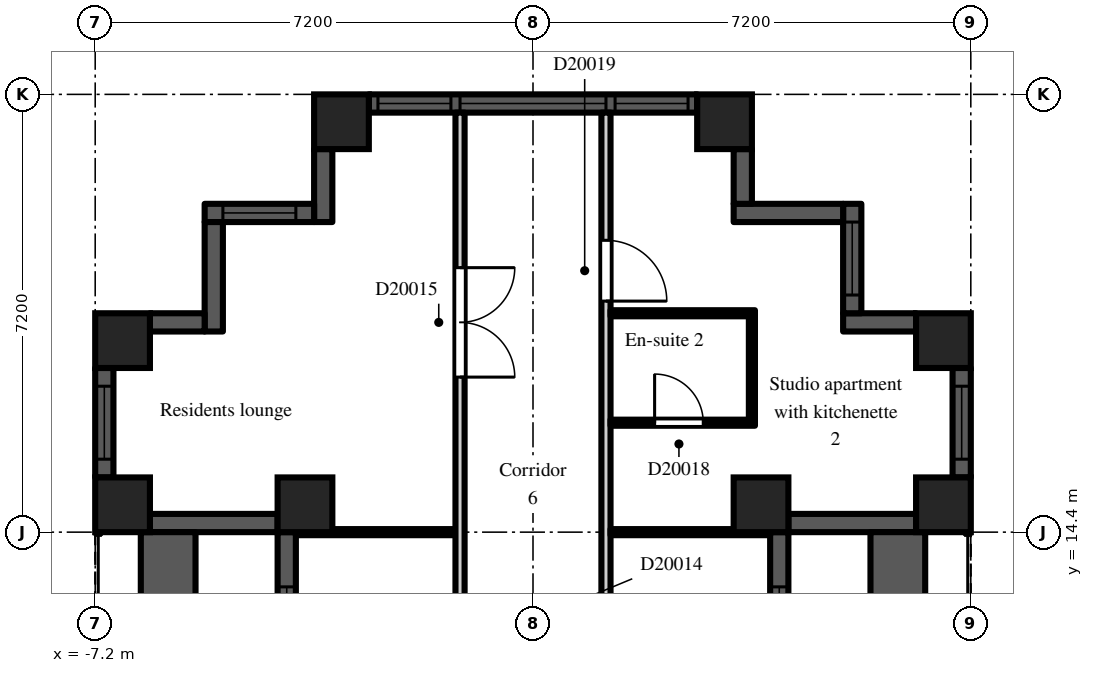
"""IFC4 building model, lengths in metres.
Left out: names, types, materials, properties, quantities, classifications, styles, units other than length and angle.
Written with IfcOpenShell. Run it as: python <this file> out.ifc"""

import sys

from ifc_helpers import new_model, si_unit, direction, frame, frame_2d, origin, origin_2d, place, context, subcontext, project, spatial, rectangle, extrude, element, fill, save


model = new_model("IFC4")
c1 = context("Model", 3, precision=1e-05, world=origin(), true_north=direction((0.0, 1.0)))
c2 = subcontext(c1, "Body", "Model", "MODEL_VIEW")
j1 = project(units=[si_unit("LENGTHUNIT", "METRE"), si_unit("PLANEANGLEUNIT", "RADIAN")], contexts=[c1])
p1 = place(None, origin())
s1 = spatial("IfcSite", under=j1, at=p1, CompositionType="ELEMENT")
p2 = place(p1, origin())
s2 = spatial("IfcBuilding", under=s1, at=p2, CompositionType="ELEMENT")
p3 = place(p2, frame((0.0, 0.0, 138.3)))
s3 = spatial("IfcBuildingStorey", under=s2, at=p3, CompositionType="ELEMENT", Elevation=138.3)
for number, where, z_axis, x_axis in (
    (1, (-6.75, 14.85, 0.0), (0.0, 0.0, 1.0), (1.0, 0.0, 0.0)),
    (2, (-6.75, 17.55, 0.0), (0.0, 0.0, 1.0), (1.0, 0.0, 0.0)),
    (3, (-3.75, 14.85, 0.0), (0.0, 0.0, 1.0), (1.0, 0.0, 0.0)),
    (4, (-3.15, 21.15, 0.0), (0.0, 0.0, 1.0), (1.0, 0.0, 0.0)),
    (5, (3.15, 21.15, 0.0), (0.0, 0.0, 1.0), (1.0, 0.0, 0.0)),
    (6, (3.75, 14.85, 0.0), (0.0, 0.0, 1.0), (1.0, 0.0, 0.0)),
    (7, (6.75, 14.85, 0.0), (0.0, 0.0, 1.0), (1.0, 0.0, 0.0)),
    (8, (6.75, 17.55, 0.0), (0.0, 0.0, 1.0), (1.0, 0.0, 0.0)),
):
    element("IfcColumn", number, at=place(p3, frame(where, z_axis=z_axis, x_axis=x_axis)), inside=s3, PredefinedType="COLUMN", context=c2, shape_type="SweptSolid", body=[
        extrude(rectangle(XDim=0.9, YDim=0.9, at=origin_2d()), origin(), (0.0, 0.0, 1.0), 3.0),
    ])
p4 = place(p3, frame((4.05, 7.2, 0.0), z_axis=(0.0, 0.0, 1.0), x_axis=(0.0, 1.0, 0.0)))
e9 = element("IfcWall", 9, at=p4, inside=s3, PredefinedType="SOLIDWALL", context=c2, shape_type="SweptSolid", body=[
    extrude(rectangle(XDim=7.2, YDim=0.3, at=frame_2d((3.6, 0.0))), origin(), (0.0, 0.0, 1.0), 2.2),
])
p5 = place(p4, frame((3.0, 0.0, 0.0)))
e10 = element("IfcOpeningElement", 10, at=p5, cuts=e9, PredefinedType="OPENING", context=c2, shape_type="SweptSolid", body=[
    extrude(rectangle(XDim=1.2, YDim=2.05, at=frame_2d((0.6, 1.025))), frame((0.0, 0.16, 0.0), z_axis=(0.0, -1.0, 0.0), x_axis=(1.0, 0.0, 0.0)), (0.0, 0.0, 1.0), 0.32),
])
p6 = place(p4, frame((0.9, 0.0, 0.2)))
e11 = element("IfcOpeningElement", 11, at=p6, cuts=e9, PredefinedType="OPENING", context=c2, shape_type="SweptSolid", body=[
    extrude(rectangle(XDim=1.8, YDim=1.85, at=frame_2d((0.9, 0.925))), frame((0.0, 0.16, 0.0), z_axis=(0.0, -1.0, 0.0), x_axis=(1.0, 0.0, 0.0)), (0.0, 0.0, 1.0), 0.32),
])
p7 = place(p4, frame((4.5, 0.0, 0.2)))
e12 = element("IfcOpeningElement", 12, at=p7, cuts=e9, PredefinedType="OPENING", context=c2, shape_type="SweptSolid", body=[
    extrude(rectangle(XDim=1.8, YDim=1.85, at=frame_2d((0.9, 0.925))), frame((0.0, 0.16, 0.0), z_axis=(0.0, -1.0, 0.0), x_axis=(1.0, 0.0, 0.0)), (0.0, 0.0, 1.0), 0.32),
])
p8 = place(p3, frame((4.2, 14.55, 0.0), z_axis=(0.0, 0.0, 1.0), x_axis=(1.0, 0.0, 0.0)))
e13 = element("IfcWall", 13, at=p8, inside=s3, PredefinedType="SOLIDWALL", context=c2, shape_type="SweptSolid", body=[
    extrude(rectangle(XDim=2.1, YDim=0.3, at=frame_2d((1.05, 0.0))), origin(), (0.0, 0.0, 1.0), 2.2),
])
p9 = place(p3, frame((7.05, 15.3, 0.0), z_axis=(0.0, 0.0, 1.0), x_axis=(0.0, 1.0, 0.0)))
e14 = element("IfcWall", 14, at=p9, inside=s3, PredefinedType="SOLIDWALL", context=c2, shape_type="SweptSolid", body=[
    extrude(rectangle(XDim=1.8, YDim=0.3, at=frame_2d((0.9, 0.0))), origin(), (0.0, 0.0, 1.0), 2.2),
])
p10 = place(p9, frame((0.3, 0.0, 0.2)))
e15 = element("IfcOpeningElement", 15, at=p10, cuts=e14, PredefinedType="OPENING", context=c2, shape_type="SweptSolid", body=[
    extrude(rectangle(XDim=1.2, YDim=1.85, at=frame_2d((0.6, 0.925))), frame((0.0, 0.16, 0.0), z_axis=(0.0, -1.0, 0.0), x_axis=(1.0, 0.0, 0.0)), (0.0, 0.0, 1.0), 0.32),
])
p11 = place(p3, frame((6.3, 17.85, 0.0), z_axis=(0.0, 0.0, 1.0), x_axis=(-1.0, 0.0, 0.0)))
e16 = element("IfcWall", 16, at=p11, inside=s3, PredefinedType="SOLIDWALL", context=c2, shape_type="SweptSolid", body=[
    extrude(rectangle(XDim=1.2, YDim=0.3, at=frame_2d((0.6, 0.0))), origin(), (0.0, 0.0, 1.0), 2.6),
])
p12 = place(p3, frame((5.25, 18.0, 0.0), z_axis=(0.0, 0.0, 1.0), x_axis=(0.0, 1.0, 0.0)))
e17 = element("IfcWall", 17, at=p12, inside=s3, PredefinedType="SOLIDWALL", context=c2, shape_type="SweptSolid", body=[
    extrude(rectangle(XDim=1.8, YDim=0.3, at=frame_2d((0.9, 0.0))), origin(), (0.0, 0.0, 1.0), 2.6),
])
p13 = place(p12, frame((0.3, 0.0, 0.2)))
e18 = element("IfcOpeningElement", 18, at=p13, cuts=e17, PredefinedType="OPENING", context=c2, shape_type="SweptSolid", body=[
    extrude(rectangle(XDim=1.2, YDim=1.85, at=frame_2d((0.6, 0.925))), frame((0.0, 0.16, 0.0), z_axis=(0.0, -1.0, 0.0), x_axis=(1.0, 0.0, 0.0)), (0.0, 0.0, 1.0), 0.32),
])
p14 = place(p3, frame((5.1, 19.65, 0.0), z_axis=(0.0, 0.0, 1.0), x_axis=(-1.0, 0.0, 0.0)))
e19 = element("IfcWall", 19, at=p14, inside=s3, PredefinedType="SOLIDWALL", context=c2, shape_type="SweptSolid", body=[
    extrude(rectangle(XDim=1.8, YDim=0.3, at=frame_2d((0.9, 0.0))), origin(), (0.0, 0.0, 1.0), 2.6),
])
p15 = place(p3, frame((3.45, 19.8, 0.0), z_axis=(0.0, 0.0, 1.0), x_axis=(0.0, 1.0, 0.0)))
e20 = element("IfcWall", 20, at=p15, inside=s3, PredefinedType="SOLIDWALL", context=c2, shape_type="SweptSolid", body=[
    extrude(rectangle(XDim=0.9, YDim=0.3, at=frame_2d((0.45, 0.0))), origin(), (0.0, 0.0, 1.0), 2.6),
])
p16 = place(p3, frame((2.7, 21.45, 0.0), z_axis=(0.0, 0.0, 1.0), x_axis=(-1.0, 0.0, 0.0)))
e21 = element("IfcWall", 21, at=p16, inside=s3, PredefinedType="SOLIDWALL", context=c2, shape_type="SweptSolid", body=[
    extrude(rectangle(XDim=5.4, YDim=0.3, at=frame_2d((2.7, 0.0))), origin(), (0.0, 0.0, 1.0), 2.2),
])
p17 = place(p16, frame((1.5, 0.0, 0.2)))
e22 = element("IfcOpeningElement", 22, at=p17, cuts=e21, PredefinedType="OPENING", context=c2, shape_type="SweptSolid", body=[
    extrude(rectangle(XDim=2.4, YDim=1.85, at=frame_2d((1.2, 0.925))), frame((0.0, 0.16, 0.0), z_axis=(0.0, -1.0, 0.0), x_axis=(1.0, 0.0, 0.0)), (0.0, 0.0, 1.0), 0.32),
])
p18 = place(p16, frame((0.15, 0.0, 0.2)))
e23 = element("IfcOpeningElement", 23, at=p18, cuts=e21, PredefinedType="OPENING", context=c2, shape_type="SweptSolid", body=[
    extrude(rectangle(XDim=1.2, YDim=1.85, at=frame_2d((0.6, 0.925))), frame((0.0, 0.16, 0.0), z_axis=(0.0, -1.0, 0.0), x_axis=(1.0, 0.0, 0.0)), (0.0, 0.0, 1.0), 0.32),
])
p19 = place(p16, frame((4.05, 0.0, 0.2)))
e24 = element("IfcOpeningElement", 24, at=p19, cuts=e21, PredefinedType="OPENING", context=c2, shape_type="SweptSolid", body=[
    extrude(rectangle(XDim=1.2, YDim=1.85, at=frame_2d((0.6, 0.925))), frame((0.0, 0.16, 0.0), z_axis=(0.0, -1.0, 0.0), x_axis=(1.0, 0.0, 0.0)), (0.0, 0.0, 1.0), 0.32),
])
p20 = place(p3, frame((-3.45, 20.7, 0.0), z_axis=(0.0, 0.0, 1.0), x_axis=(0.0, -1.0, 0.0)))
e25 = element("IfcWall", 25, at=p20, inside=s3, PredefinedType="SOLIDWALL", context=c2, shape_type="SweptSolid", body=[
    extrude(rectangle(XDim=1.2, YDim=0.3, at=frame_2d((0.6, 0.0))), origin(), (0.0, 0.0, 1.0), 2.6),
])
p21 = place(p3, frame((-3.6, 19.65, 0.0), z_axis=(0.0, 0.0, 1.0), x_axis=(-1.0, 0.0, 0.0)))
e26 = element("IfcWall", 26, at=p21, inside=s3, PredefinedType="SOLIDWALL", context=c2, shape_type="SweptSolid", body=[
    extrude(rectangle(XDim=1.8, YDim=0.3, at=frame_2d((0.9, 0.0))), origin(), (0.0, 0.0, 1.0), 2.6),
])
p22 = place(p21, frame((0.3, 0.0, 0.2)))
e27 = element("IfcOpeningElement", 27, at=p22, cuts=e26, PredefinedType="OPENING", context=c2, shape_type="SweptSolid", body=[
    extrude(rectangle(XDim=1.2, YDim=1.85, at=frame_2d((0.6, 0.925))), frame((0.0, 0.16, 0.0), z_axis=(0.0, -1.0, 0.0), x_axis=(1.0, 0.0, 0.0)), (0.0, 0.0, 1.0), 0.32),
])
p23 = place(p3, frame((-5.25, 19.5, 0.0), z_axis=(0.0, 0.0, 1.0), x_axis=(0.0, -1.0, 0.0)))
e28 = element("IfcWall", 28, at=p23, inside=s3, PredefinedType="SOLIDWALL", context=c2, shape_type="SweptSolid", body=[
    extrude(rectangle(XDim=1.8, YDim=0.3, at=frame_2d((0.9, 0.0))), origin(), (0.0, 0.0, 1.0), 2.6),
])
p24 = place(p3, frame((-5.4, 17.85, 0.0), z_axis=(0.0, 0.0, 1.0), x_axis=(-1.0, 0.0, 0.0)))
e29 = element("IfcWall", 29, at=p24, inside=s3, PredefinedType="SOLIDWALL", context=c2, shape_type="SweptSolid", body=[
    extrude(rectangle(XDim=0.9, YDim=0.3, at=frame_2d((0.45, 0.0))), origin(), (0.0, 0.0, 1.0), 2.6),
])
p25 = place(p3, frame((-7.05, 17.1, 0.0), z_axis=(0.0, 0.0, 1.0), x_axis=(0.0, -1.0, 0.0)))
e30 = element("IfcWall", 30, at=p25, inside=s3, PredefinedType="SOLIDWALL", context=c2, shape_type="SweptSolid", body=[
    extrude(rectangle(XDim=1.8, YDim=0.3, at=frame_2d((0.9, 0.0))), origin(), (0.0, 0.0, 1.0), 2.2),
])
p26 = place(p25, frame((0.3, 0.0, 0.2)))
e31 = element("IfcOpeningElement", 31, at=p26, cuts=e30, PredefinedType="OPENING", context=c2, shape_type="SweptSolid", body=[
    extrude(rectangle(XDim=1.2, YDim=1.85, at=frame_2d((0.6, 0.925))), frame((0.0, 0.16, 0.0), z_axis=(0.0, -1.0, 0.0), x_axis=(1.0, 0.0, 0.0)), (0.0, 0.0, 1.0), 0.32),
])
p27 = place(p3, frame((-6.3, 14.55, 0.0), z_axis=(0.0, 0.0, 1.0), x_axis=(1.0, 0.0, 0.0)))
e32 = element("IfcWall", 32, at=p27, inside=s3, PredefinedType="SOLIDWALL", context=c2, shape_type="SweptSolid", body=[
    extrude(rectangle(XDim=2.1, YDim=0.3, at=frame_2d((1.05, 0.0))), origin(), (0.0, 0.0, 1.0), 2.2),
])
p28 = place(p3, frame((-4.05, 14.4, 0.0), z_axis=(0.0, 0.0, 1.0), x_axis=(0.0, -1.0, 0.0)))
e33 = element("IfcWall", 33, at=p28, inside=s3, PredefinedType="SOLIDWALL", context=c2, shape_type="SweptSolid", body=[
    extrude(rectangle(XDim=7.2, YDim=0.3, at=frame_2d((3.6, 0.0))), origin(), (0.0, 0.0, 1.0), 2.2),
])
p29 = place(p28, frame((3.0, 0.0, 0.0)))
e34 = element("IfcOpeningElement", 34, at=p29, cuts=e33, PredefinedType="OPENING", context=c2, shape_type="SweptSolid", body=[
    extrude(rectangle(XDim=1.2, YDim=2.05, at=frame_2d((0.6, 1.025))), frame((0.0, 0.16, 0.0), z_axis=(0.0, -1.0, 0.0), x_axis=(1.0, 0.0, 0.0)), (0.0, 0.0, 1.0), 0.32),
])
p30 = place(p28, frame((0.9, 0.0, 0.2)))
e35 = element("IfcOpeningElement", 35, at=p30, cuts=e33, PredefinedType="OPENING", context=c2, shape_type="SweptSolid", body=[
    extrude(rectangle(XDim=1.8, YDim=1.85, at=frame_2d((0.9, 0.925))), frame((0.0, 0.16, 0.0), z_axis=(0.0, -1.0, 0.0), x_axis=(1.0, 0.0, 0.0)), (0.0, 0.0, 1.0), 0.32),
])
p31 = place(p28, frame((4.5, 0.0, 0.2)))
e36 = element("IfcOpeningElement", 36, at=p31, cuts=e33, PredefinedType="OPENING", context=c2, shape_type="SweptSolid", body=[
    extrude(rectangle(XDim=1.8, YDim=1.85, at=frame_2d((0.9, 0.925))), frame((0.0, 0.16, 0.0), z_axis=(0.0, -1.0, 0.0), x_axis=(1.0, 0.0, 0.0)), (0.0, 0.0, 1.0), 0.32),
])
for number, where, z_axis, x_axis in (
    (37, (6.0, 7.2, 0.0), (0.0, 0.0, 1.0), (0.0, 1.0, 0.0)),
    (38, (-6.0, 7.2, 0.0), (0.0, 0.0, 1.0), (0.0, 1.0, 0.0)),
):
    element("IfcWall", number, at=place(p3, frame(where, z_axis=z_axis, x_axis=x_axis)), inside=s3, PredefinedType="PARAPET", context=c2, shape_type="SweptSolid", body=[
        extrude(rectangle(XDim=7.2, YDim=0.9, at=frame_2d((3.6, 0.0))), origin(), (0.0, 0.0, 1.0), 0.8),
    ])
p32 = place(p3, frame((-3.9, 14.4, 0.0), z_axis=(0.0, 0.0, 1.0), x_axis=(1.0, 0.0, 0.0)))
e39 = element("IfcWall", 39, at=p32, inside=s3, PredefinedType="PARTITIONING", context=c2, shape_type="SweptSolid", body=[
    extrude(rectangle(XDim=2.625, YDim=0.1, at=frame_2d((1.312, 0.0))), origin(), (0.0, 0.0, 1.0), 2.6),
])
p33 = place(p3, frame((-1.2, 7.275, 0.0), z_axis=(0.0, 0.0, 1.0), x_axis=(0.0, 1.0, 0.0)))
e40 = element("IfcWall", 40, at=p33, inside=s3, PredefinedType="PARTITIONING", context=c2, shape_type="SweptSolid", body=[
    extrude(rectangle(XDim=14.025, YDim=0.15, at=frame_2d((7.013, 0.0))), origin(), (0.0, 0.0, 1.0), 2.6),
])
p34 = place(p33, frame((4.875, 0.0, 0.0)))
e41 = element("IfcOpeningElement", 41, at=p34, cuts=e40, PredefinedType="OPENING", context=c2, shape_type="SweptSolid", body=[
    extrude(rectangle(XDim=0.9, YDim=2.1, at=frame_2d((0.45, 1.05))), frame((0.0, 0.085, 0.0), z_axis=(0.0, -1.0, 0.0), x_axis=(1.0, 0.0, 0.0)), (0.0, 0.0, 1.0), 0.17),
])
p35 = place(p33, frame((9.675, 0.0, 0.0)))
e42 = element("IfcOpeningElement", 42, at=p35, cuts=e40, PredefinedType="OPENING", context=c2, shape_type="SweptSolid", body=[
    extrude(rectangle(XDim=1.8, YDim=2.1, at=frame_2d((0.9, 1.05))), frame((0.0, 0.085, 0.0), z_axis=(0.0, -1.0, 0.0), x_axis=(1.0, 0.0, 0.0)), (0.0, 0.0, 1.0), 0.17),
])
p36 = place(p3, frame((1.2, 7.125, 0.0), z_axis=(0.0, 0.0, 1.0), x_axis=(0.0, 1.0, 0.0)))
e43 = element("IfcWall", 43, at=p36, inside=s3, PredefinedType="PARTITIONING", context=c2, shape_type="SweptSolid", body=[
    extrude(rectangle(XDim=14.175, YDim=0.15, at=frame_2d((7.087, 0.0))), origin(), (0.0, 0.0, 1.0), 2.6),
])
p37 = place(p36, frame((1.025, 0.0, 0.0)))
e44 = element("IfcOpeningElement", 44, at=p37, cuts=e43, PredefinedType="OPENING", context=c2, shape_type="SweptSolid", body=[
    extrude(rectangle(XDim=0.9, YDim=2.1, at=frame_2d((0.45, 1.05))), frame((0.0, 0.085, 0.0), z_axis=(0.0, -1.0, 0.0), x_axis=(1.0, 0.0, 0.0)), (0.0, 0.0, 1.0), 0.17),
])
p38 = place(p36, frame((4.625, 0.0, 0.0)))
e45 = element("IfcOpeningElement", 45, at=p38, cuts=e43, PredefinedType="OPENING", context=c2, shape_type="SweptSolid", body=[
    extrude(rectangle(XDim=0.9, YDim=2.1, at=frame_2d((0.45, 1.05))), frame((0.0, 0.085, 0.0), z_axis=(0.0, -1.0, 0.0), x_axis=(1.0, 0.0, 0.0)), (0.0, 0.0, 1.0), 0.17),
])
p39 = place(p36, frame((11.075, 0.0, 0.0)))
e46 = element("IfcOpeningElement", 46, at=p39, cuts=e43, PredefinedType="OPENING", context=c2, shape_type="SweptSolid", body=[
    extrude(rectangle(XDim=1.0, YDim=2.1, at=frame_2d((0.5, 1.05))), frame((0.0, 0.085, 0.0), z_axis=(0.0, -1.0, 0.0), x_axis=(1.0, 0.0, 0.0)), (0.0, 0.0, 1.0), 0.17),
])
p40 = place(p3, frame((1.275, 14.4, 0.0), z_axis=(0.0, 0.0, 1.0), x_axis=(1.0, 0.0, 0.0)))
e47 = element("IfcWall", 47, at=p40, inside=s3, PredefinedType="PARTITIONING", context=c2, shape_type="SweptSolid", body=[
    extrude(rectangle(XDim=2.625, YDim=0.1, at=frame_2d((1.312, 0.0))), origin(), (0.0, 0.0, 1.0), 2.6),
])
p41 = place(p3, frame((1.275, 16.2, 0.0), z_axis=(0.0, 0.0, 1.0), x_axis=(1.0, 0.0, 0.0)))
e48 = element("IfcWall", 48, at=p41, inside=s3, PredefinedType="PARTITIONING", context=c2, shape_type="SweptSolid", body=[
    extrude(rectangle(XDim=2.375, YDim=0.1, at=frame_2d((1.188, 0.0))), origin(), (0.0, 0.0, 1.0), 2.6),
])
p42 = place(p41, frame((0.725, 0.0, 0.0)))
e49 = element("IfcOpeningElement", 49, at=p42, cuts=e48, PredefinedType="OPENING", context=c2, shape_type="SweptSolid", body=[
    extrude(rectangle(XDim=0.8, YDim=2.1, at=frame_2d((0.4, 1.05))), frame((0.0, 0.06, 0.0), z_axis=(0.0, -1.0, 0.0), x_axis=(1.0, 0.0, 0.0)), (0.0, 0.0, 1.0), 0.12),
])
p43 = place(p3, frame((1.275, 18.0, 0.0), z_axis=(0.0, 0.0, 1.0), x_axis=(1.0, 0.0, 0.0)))
e50 = element("IfcWall", 50, at=p43, inside=s3, PredefinedType="PARTITIONING", context=c2, shape_type="SweptSolid", body=[
    extrude(rectangle(XDim=2.375, YDim=0.1, at=frame_2d((1.188, 0.0))), origin(), (0.0, 0.0, 1.0), 2.6),
])
p44 = place(p3, frame((3.6, 16.25, 0.0), z_axis=(0.0, 0.0, 1.0), x_axis=(0.0, 1.0, 0.0)))
e51 = element("IfcWall", 51, at=p44, inside=s3, PredefinedType="PARTITIONING", context=c2, shape_type="SweptSolid", body=[
    extrude(rectangle(XDim=1.7, YDim=0.1, at=frame_2d((0.85, 0.0))), origin(), (0.0, 0.0, 1.0), 2.6),
])
p45 = place(p7, origin())
e52 = element("IfcWindow", 52, at=p45, inside=s3, PartitioningType="SINGLE_PANEL", PredefinedType="WINDOW", context=c2, shape_type="SweptSolid", body=[
    extrude(rectangle(XDim=1.8, YDim=1.85, at=frame_2d((0.9, 0.925))), frame((0.0, 0.03, 0.0), z_axis=(0.0, -1.0, 0.0), x_axis=(1.0, 0.0, 0.0)), (0.0, 0.0, 1.0), 0.06),
])
fill(e12, e52)
p46 = place(p10, origin())
e53 = element("IfcWindow", 53, at=p46, inside=s3, PartitioningType="SINGLE_PANEL", PredefinedType="WINDOW", context=c2, shape_type="SweptSolid", body=[
    extrude(rectangle(XDim=1.2, YDim=1.85, at=frame_2d((0.6, 0.925))), frame((0.0, 0.03, 0.0), z_axis=(0.0, -1.0, 0.0), x_axis=(1.0, 0.0, 0.0)), (0.0, 0.0, 1.0), 0.06),
])
fill(e15, e53)
p47 = place(p13, origin())
e54 = element("IfcWindow", 54, at=p47, inside=s3, PartitioningType="SINGLE_PANEL", PredefinedType="WINDOW", context=c2, shape_type="SweptSolid", body=[
    extrude(rectangle(XDim=1.2, YDim=1.85, at=frame_2d((0.6, 0.925))), frame((0.0, 0.03, 0.0), z_axis=(0.0, -1.0, 0.0), x_axis=(1.0, 0.0, 0.0)), (0.0, 0.0, 1.0), 0.06),
])
fill(e18, e54)
p48 = place(p17, origin())
e55 = element("IfcWindow", 55, at=p48, inside=s3, PartitioningType="SINGLE_PANEL", PredefinedType="WINDOW", context=c2, shape_type="SweptSolid", body=[
    extrude(rectangle(XDim=2.4, YDim=1.85, at=frame_2d((1.2, 0.925))), frame((0.0, 0.03, 0.0), z_axis=(0.0, -1.0, 0.0), x_axis=(1.0, 0.0, 0.0)), (0.0, 0.0, 1.0), 0.06),
])
fill(e22, e55)
p49 = place(p18, origin())
e56 = element("IfcWindow", 56, at=p49, inside=s3, PartitioningType="SINGLE_PANEL", PredefinedType="WINDOW", context=c2, shape_type="SweptSolid", body=[
    extrude(rectangle(XDim=1.2, YDim=1.85, at=frame_2d((0.6, 0.925))), frame((0.0, 0.03, 0.0), z_axis=(0.0, -1.0, 0.0), x_axis=(1.0, 0.0, 0.0)), (0.0, 0.0, 1.0), 0.06),
])
fill(e23, e56)
p50 = place(p19, origin())
e57 = element("IfcWindow", 57, at=p50, inside=s3, PartitioningType="SINGLE_PANEL", PredefinedType="WINDOW", context=c2, shape_type="SweptSolid", body=[
    extrude(rectangle(XDim=1.2, YDim=1.85, at=frame_2d((0.6, 0.925))), frame((0.0, 0.03, 0.0), z_axis=(0.0, -1.0, 0.0), x_axis=(1.0, 0.0, 0.0)), (0.0, 0.0, 1.0), 0.06),
])
fill(e24, e57)
p51 = place(p22, origin())
e58 = element("IfcWindow", 58, at=p51, inside=s3, PartitioningType="SINGLE_PANEL", PredefinedType="WINDOW", context=c2, shape_type="SweptSolid", body=[
    extrude(rectangle(XDim=1.2, YDim=1.85, at=frame_2d((0.6, 0.925))), frame((0.0, 0.03, 0.0), z_axis=(0.0, -1.0, 0.0), x_axis=(1.0, 0.0, 0.0)), (0.0, 0.0, 1.0), 0.06),
])
fill(e27, e58)
p52 = place(p26, origin())
e59 = element("IfcWindow", 59, at=p52, inside=s3, PartitioningType="SINGLE_PANEL", PredefinedType="WINDOW", context=c2, shape_type="SweptSolid", body=[
    extrude(rectangle(XDim=1.2, YDim=1.85, at=frame_2d((0.6, 0.925))), frame((0.0, 0.03, 0.0), z_axis=(0.0, -1.0, 0.0), x_axis=(1.0, 0.0, 0.0)), (0.0, 0.0, 1.0), 0.06),
])
fill(e31, e59)
p53 = place(p30, origin())
e60 = element("IfcWindow", 60, at=p53, inside=s3, PartitioningType="SINGLE_PANEL", PredefinedType="WINDOW", context=c2, shape_type="SweptSolid", body=[
    extrude(rectangle(XDim=1.8, YDim=1.85, at=frame_2d((0.9, 0.925))), frame((0.0, 0.03, 0.0), z_axis=(0.0, -1.0, 0.0), x_axis=(1.0, 0.0, 0.0)), (0.0, 0.0, 1.0), 0.06),
])
fill(e35, e60)
p54 = place(p35, frame((1.8, 0.0, 0.0), z_axis=(0.0, 0.0, 1.0), x_axis=(-1.0, 0.0, 0.0)))
e61 = element("IfcDoor", 61, at=p54, inside=s3, OperationType="DOUBLE_DOOR_DOUBLE_SWING", PredefinedType="DOOR", context=c2, shape_type="SweptSolid", body=[
    extrude(rectangle(XDim=1.8, YDim=2.1, at=frame_2d((0.9, 1.05))), frame((0.0, 0.025, 0.0), z_axis=(0.0, -1.0, 0.0), x_axis=(1.0, 0.0, 0.0)), (0.0, 0.0, 1.0), 0.05),
])
fill(e42, e61)
p55 = place(p42, origin())
e62 = element("IfcDoor", 62, at=p55, inside=s3, OperationType="SINGLE_SWING_LEFT", PredefinedType="DOOR", context=c2, shape_type="SweptSolid", body=[
    extrude(rectangle(XDim=0.8, YDim=2.1, at=frame_2d((0.4, 1.05))), frame((0.0, 0.025, 0.0), z_axis=(0.0, -1.0, 0.0), x_axis=(1.0, 0.0, 0.0)), (0.0, 0.0, 1.0), 0.05),
])
fill(e49, e62)
p56 = place(p39, frame((1.0, 0.0, 0.0), z_axis=(0.0, 0.0, 1.0), x_axis=(-1.0, 0.0, 0.0)))
e63 = element("IfcDoor", 63, at=p56, inside=s3, OperationType="SINGLE_SWING_RIGHT", PredefinedType="DOOR", context=c2, shape_type="SweptSolid", body=[
    extrude(rectangle(XDim=1.0, YDim=2.1, at=frame_2d((0.5, 1.05))), frame((0.0, 0.025, 0.0), z_axis=(0.0, -1.0, 0.0), x_axis=(1.0, 0.0, 0.0)), (0.0, 0.0, 1.0), 0.05),
])
fill(e46, e63)
save(model, sys.argv[1])
